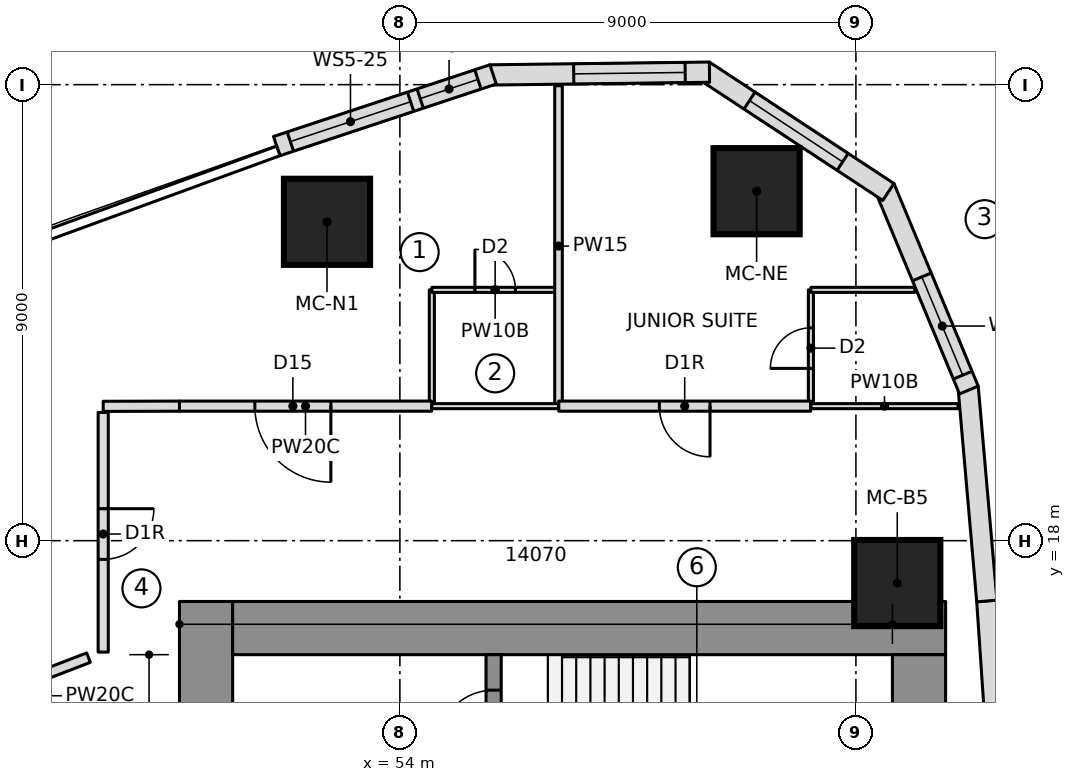
"""IFC4 building model, lengths in metres.
Left out: names, types, materials, properties, quantities, classifications, styles, units other than length and angle.
Written with IfcOpenShell. Run it as: python <this file> out.ifc"""

import sys

from ifc_helpers import new_model, si_unit, direction, frame, frame_2d, origin, origin_2d, place, context, subcontext, project, spatial, polyline, rectangle, outline, extrude, element, fill, save


model = new_model("IFC4")
c1 = context("Model", 3, precision=1e-05, world=origin(), true_north=direction((0.0, 1.0)))
c2 = subcontext(c1, "Body", "Model", "MODEL_VIEW")
j1 = project(units=[si_unit("LENGTHUNIT", "METRE"), si_unit("PLANEANGLEUNIT", "RADIAN")], contexts=[c1])
p1 = place(None, origin())
s1 = spatial("IfcSite", under=j1, at=p1, CompositionType="ELEMENT")
p2 = place(p1, origin())
s2 = spatial("IfcBuilding", under=s1, at=p2, CompositionType="ELEMENT")
p3 = place(p2, frame((0.0, 0.0, 92.0)))
s3 = spatial("IfcBuildingStorey", under=s2, at=p3, CompositionType="ELEMENT", Elevation=92.0)
p4 = place(p3, frame((50.175, 6.65, 0.0), z_axis=(0.0, 0.0, 1.0), x_axis=(0.0, 1.0, 0.0)))
e1 = element("IfcWall", 1, at=p4, inside=s3, PredefinedType="SHEAR", context=c2, shape_type="SweptSolid", body=[
    extrude(rectangle(XDim=10.15, YDim=1.05, at=frame_2d((5.075, 0.0))), origin(), (0.0, 0.0, 1.0), 3.55),
])
p5 = place(p4, frame((6.5, 0.0, 0.0)))
e2 = element("IfcOpeningElement", 2, at=p5, cuts=e1, PredefinedType="OPENING", context=c2, shape_type="SweptSolid", body=[
    extrude(rectangle(XDim=1.1, YDim=2.1, at=frame_2d((0.55, 1.05))), frame((0.0, 0.535, 0.0), z_axis=(0.0, -1.0, 0.0), x_axis=(1.0, 0.0, 0.0)), (0.0, 0.0, 1.0), 1.07),
])
p6 = place(p3, frame((50.7, 16.275, 0.0), z_axis=(0.0, 0.0, 1.0), x_axis=(1.0, 0.0, 0.0)))
e3 = element("IfcWall", 3, at=p6, inside=s3, PredefinedType="SHEAR", context=c2, shape_type="SweptSolid", body=[
    extrude(rectangle(XDim=14.07, YDim=1.05, at=frame_2d((7.035, 0.0))), origin(), (0.0, 0.0, 1.0), 3.55),
])
p7 = place(p3, frame((64.245, 9.389, 0.0), z_axis=(0.0, 0.0, 1.0), x_axis=(0.0, 1.0, 0.0)))
e4 = element("IfcWall", 4, at=p7, inside=s3, PredefinedType="SHEAR", context=c2, shape_type="SweptSolid", body=[
    extrude(rectangle(XDim=6.361, YDim=1.05, at=frame_2d((3.181, 0.0))), origin(), (0.0, 0.0, 1.0), 3.55),
])
p8 = place(p3, frame((55.85, 10.35, 0.0), z_axis=(0.0, 0.0, 1.0), x_axis=(0.0, 1.0, 0.0)))
e5 = element("IfcWall", 5, at=p8, inside=s3, PredefinedType="SHEAR", context=c2, shape_type="SweptSolid", body=[
    extrude(rectangle(XDim=5.4, YDim=0.3, at=frame_2d((2.7, 0.0))), origin(), (0.0, 0.0, 1.0), 3.55),
])
p9 = place(p8, frame((1.43, 0.0, 0.0)))
e6 = element("IfcOpeningElement", 6, at=p9, cuts=e5, PredefinedType="OPENING", context=c2, shape_type="SweptSolid", body=[
    extrude(rectangle(XDim=1.1, YDim=2.1, at=frame_2d((0.55, 1.05))), frame((0.0, 0.16, 0.0), z_axis=(0.0, -1.0, 0.0), x_axis=(1.0, 0.0, 0.0)), (0.0, 0.0, 1.0), 0.32),
])
p10 = place(p8, frame((3.6, 0.0, 0.0)))
e7 = element("IfcOpeningElement", 7, at=p10, cuts=e5, PredefinedType="OPENING", context=c2, shape_type="SweptSolid", body=[
    extrude(rectangle(XDim=1.1, YDim=2.1, at=frame_2d((0.55, 1.05))), frame((0.0, 0.16, 0.0), z_axis=(0.0, -1.0, 0.0), x_axis=(1.0, 0.0, 0.0)), (0.0, 0.0, 1.0), 0.32),
])
for number, where, z_axis, x_axis in (
    (8, (63.816, 17.164, 0.0), (0.0, 0.0, 1.0), (1.0, 0.0, 0.0)),
    (9, (61.04, 24.897, 0.0), (0.0, 0.0, 1.0), (1.0, 0.0, 0.0)),
    (10, (52.562, 24.293, 0.0), (0.0, 0.0, 1.0), (1.0, 0.0, 0.0)),
):
    element("IfcColumn", number, at=place(p3, frame(where, z_axis=z_axis, x_axis=x_axis)), inside=s3, PredefinedType="COLUMN", context=c2, shape_type="SweptSolid", body=[
        extrude(rectangle(XDim=1.7, YDim=1.7, at=origin_2d()), origin(), (0.0, 0.0, 1.0), 3.55),
    ])
p11 = place(p3, frame((65.868, 12.614, 0.0), z_axis=(0.0, 0.0, 1.0), x_axis=(-0.067724559895, 0.997704056315, 0.0)))
e11 = element("IfcWall", 11, at=p11, inside=s3, PredefinedType="NOTDEFINED", context=c2, shape_type="SweptSolid", body=[
    extrude(outline(polyline([(-0.002, -0.2), (4.209, -0.2), (4.205, 0.2), (0.002, 0.2), (-0.002, -0.2)])), origin(), (0.0, 0.0, 1.0), 3.25),
])
p12 = place(p3, frame((65.583, 16.811, 0.0), z_axis=(0.0, 0.0, 1.0), x_axis=(-0.086992730434, 0.996208946382, 0.0)))
e12 = element("IfcWall", 12, at=p12, inside=s3, PredefinedType="NOTDEFINED", context=c2, shape_type="SweptSolid", body=[
    extrude(outline(polyline([(-0.002, -0.2), (4.238, -0.2), (4.176, 0.2), (0.002, 0.2), (-0.002, -0.2)])), origin(), (0.0, 0.0, 1.0), 3.25),
])
p13 = place(p3, frame((65.217, 21.002, 0.0), z_axis=(0.0, 0.0, 1.0), x_axis=(-0.383997751971, 0.923334027577, 0.0)))
e13 = element("IfcWall", 13, at=p13, inside=s3, PredefinedType="NOTDEFINED", context=c2, shape_type="SweptSolid", body=[
    extrude(outline(polyline([(-0.031, -0.2), (4.3, -0.2), (4.177, 0.2), (0.031, 0.2), (-0.031, -0.2)])), origin(), (0.0, 0.0, 1.0), 3.25),
])
p14 = place(p13, frame((0.287, 0.0, 0.6)))
e14 = element("IfcOpeningElement", 14, at=p14, cuts=e13, PredefinedType="OPENING", context=c2, shape_type="SweptSolid", body=[
    extrude(outline(polyline([(0.0, 1.4), (0.08, 1.802), (0.308, 2.142), (0.648, 2.37), (1.05, 2.45), (1.452, 2.37), (1.792, 2.142), (2.02, 1.802), (2.1, 1.4), (2.1, 1.05), (2.02, 0.648), (1.792, 0.308), (1.452, 0.08), (1.05, 0.0), (0.648, 0.08), (0.308, 0.308), (0.08, 0.648), (0.0, 1.05), (0.0, 1.4)])), frame((0.0, 0.21, 0.0), z_axis=(0.0, -1.0, 0.0), x_axis=(1.0, 0.0, 0.0)), (0.0, 0.0, 1.0), 0.42),
])
p15 = place(p3, frame((63.59, 24.916, 0.0), z_axis=(0.0, 0.0, 1.0), x_axis=(-0.835340523653, 0.549732852887, 0.0)))
e15 = element("IfcWall", 15, at=p15, inside=s3, PredefinedType="NOTDEFINED", context=c2, shape_type="SweptSolid", body=[
    extrude(outline(polyline([(-0.061, -0.2), (4.3, -0.2), (4.178, 0.2), (0.061, 0.2), (-0.061, -0.2)])), origin(), (0.0, 0.0, 1.0), 3.25),
])
p16 = place(p15, frame((1.02, 0.0, 0.6)))
e16 = element("IfcOpeningElement", 16, at=p16, cuts=e15, PredefinedType="OPENING", context=c2, shape_type="SweptSolid", body=[
    extrude(outline(polyline([(0.0, 1.35), (0.084, 1.771), (0.322, 2.128), (0.679, 2.366), (1.1, 2.45), (1.521, 2.366), (1.878, 2.128), (2.116, 1.771), (2.2, 1.35), (2.2, 1.1), (2.116, 0.679), (1.878, 0.322), (1.521, 0.084), (1.1, 0.0), (0.679, 0.084), (0.322, 0.322), (0.084, 0.679), (0.0, 1.1), (0.0, 1.35)])), frame((0.0, 0.21, 0.0), z_axis=(0.0, -1.0, 0.0), x_axis=(1.0, 0.0, 0.0)), (0.0, 0.0, 1.0), 0.42),
])
p17 = place(p3, frame((60.049, 27.246, 0.0), z_axis=(0.0, 0.0, 1.0), x_axis=(-0.999919718849, -0.012671063772, 0.0)))
e17 = element("IfcWall", 17, at=p17, inside=s3, PredefinedType="NOTDEFINED", context=c2, shape_type="SweptSolid", body=[
    extrude(outline(polyline([(-0.061, -0.2), (4.27, -0.2), (4.208, 0.2), (0.061, 0.2), (-0.061, -0.2)])), origin(), (0.0, 0.0, 1.0), 3.25),
])
p18 = place(p17, frame((0.418, 0.0, 0.6)))
e18 = element("IfcOpeningElement", 18, at=p18, cuts=e17, PredefinedType="OPENING", context=c2, shape_type="SweptSolid", body=[
    extrude(outline(polyline([(0.0, 1.35), (0.084, 1.771), (0.322, 2.128), (0.679, 2.366), (1.1, 2.45), (1.521, 2.366), (1.878, 2.128), (2.116, 1.771), (2.2, 1.35), (2.2, 1.1), (2.116, 0.679), (1.878, 0.322), (1.521, 0.084), (1.1, 0.0), (0.679, 0.084), (0.322, 0.322), (0.084, 0.679), (0.0, 1.1), (0.0, 1.35)])), frame((0.0, 0.21, 0.0), z_axis=(0.0, -1.0, 0.0), x_axis=(1.0, 0.0, 0.0)), (0.0, 0.0, 1.0), 0.42),
])
p19 = place(p3, frame((55.81, 27.192, 0.0), z_axis=(0.0, 0.0, 1.0), x_axis=(-0.94925004851, -0.314522408429, 0.0)))
e19 = element("IfcWall", 19, at=p19, inside=s3, PredefinedType="NOTDEFINED", context=c2, shape_type="SweptSolid", body=[
    extrude(outline(polyline([(-0.031, -0.2), (4.468, -0.2), (4.468, 0.2), (0.031, 0.2), (-0.031, -0.2)])), origin(), (0.0, 0.0, 1.0), 3.25),
])
p20 = place(p19, frame((0.284, 0.0, 0.9)))
e20 = element("IfcOpeningElement", 20, at=p20, cuts=e19, PredefinedType="OPENING", context=c2, shape_type="SweptSolid", body=[
    extrude(rectangle(XDim=1.2, YDim=1.8, at=frame_2d((0.6, 0.9))), frame((0.0, 0.21, 0.0), z_axis=(0.0, -1.0, 0.0), x_axis=(1.0, 0.0, 0.0)), (0.0, 0.0, 1.0), 0.42),
])
p21 = place(p19, frame((1.684, 0.0, 0.9)))
e21 = element("IfcOpeningElement", 21, at=p21, cuts=e19, PredefinedType="OPENING", context=c2, shape_type="SweptSolid", body=[
    extrude(rectangle(XDim=2.5, YDim=1.8, at=frame_2d((1.25, 0.9))), frame((0.0, 0.21, 0.0), z_axis=(0.0, -1.0, 0.0), x_axis=(1.0, 0.0, 0.0)), (0.0, 0.0, 1.0), 0.42),
])
p22 = place(p3, frame((54.631, 20.65, 0.0), z_axis=(0.0, 0.0, 1.0), x_axis=(0.0, 1.0, 0.0)))
e22 = element("IfcWall", 22, at=p22, inside=s3, PredefinedType="PARTITIONING", context=c2, shape_type="SweptSolid", body=[
    extrude(rectangle(XDim=2.3, YDim=0.1, at=frame_2d((1.15, 0.0))), origin(), (0.0, 0.0, 1.0), 3.25),
])
p23 = place(p3, frame((54.631, 22.95, 0.0), z_axis=(0.0, 0.0, 1.0), x_axis=(1.0, 0.0, 0.0)))
e23 = element("IfcWall", 23, at=p23, inside=s3, PredefinedType="PARTITIONING", context=c2, shape_type="SweptSolid", body=[
    extrude(rectangle(XDim=2.5, YDim=0.1, at=frame_2d((1.25, 0.0))), origin(), (0.0, 0.0, 1.0), 3.25),
])
p24 = place(p23, frame((0.85, 0.0, 0.0)))
e24 = element("IfcOpeningElement", 24, at=p24, cuts=e23, PredefinedType="OPENING", context=c2, shape_type="SweptSolid", body=[
    extrude(rectangle(XDim=0.8, YDim=2.1, at=frame_2d((0.4, 1.05))), frame((0.0, 0.06, 0.0), z_axis=(0.0, -1.0, 0.0), x_axis=(1.0, 0.0, 0.0)), (0.0, 0.0, 1.0), 0.12),
])
p25 = place(p3, frame((62.111, 20.65, 0.0), z_axis=(0.0, 0.0, 1.0), x_axis=(0.0, 1.0, 0.0)))
e25 = element("IfcWall", 25, at=p25, inside=s3, PredefinedType="PARTITIONING", context=c2, shape_type="SweptSolid", body=[
    extrude(rectangle(XDim=2.3, YDim=0.1, at=frame_2d((1.15, 0.0))), origin(), (0.0, 0.0, 1.0), 3.25),
])
p26 = place(p25, frame((0.75, 0.0, 0.0)))
e26 = element("IfcOpeningElement", 26, at=p26, cuts=e25, PredefinedType="OPENING", context=c2, shape_type="SweptSolid", body=[
    extrude(rectangle(XDim=0.8, YDim=2.1, at=frame_2d((0.4, 1.05))), frame((0.0, 0.06, 0.0), z_axis=(0.0, -1.0, 0.0), x_axis=(1.0, 0.0, 0.0)), (0.0, 0.0, 1.0), 0.12),
])
p27 = place(p3, frame((62.111, 22.95, 0.0), z_axis=(0.0, 0.0, 1.0), x_axis=(1.0, 0.0, 0.0)))
e27 = element("IfcWall", 27, at=p27, inside=s3, PredefinedType="PARTITIONING", context=c2, shape_type="SweptSolid", body=[
    extrude(rectangle(XDim=2.049, YDim=0.1, at=frame_2d((1.025, 0.0))), origin(), (0.0, 0.0, 1.0), 3.25),
])
p28 = place(p3, frame((57.131, 20.65, 0.0), z_axis=(0.0, 0.0, 1.0), x_axis=(0.0, 1.0, 0.0)))
e28 = element("IfcWall", 28, at=p28, inside=s3, PredefinedType="PARTITIONING", context=c2, shape_type="SweptSolid", body=[
    extrude(rectangle(XDim=6.329, YDim=0.15, at=frame_2d((3.165, 0.0))), origin(), (0.0, 0.0, 1.0), 3.25),
])
p29 = place(p3, frame((54.625, 20.655, 0.0), z_axis=(0.0, 0.0, 1.0), x_axis=(-1.0, 0.0, 0.0)))
e29 = element("IfcWall", 29, at=p29, inside=s3, PredefinedType="PARTITIONING", context=c2, shape_type="SweptSolid", body=[
    extrude(rectangle(XDim=4.976, YDim=0.2, at=frame_2d((2.488, 0.0))), origin(), (0.0, 0.0, 1.0), 3.25),
])
p30 = place(p29, frame((1.988, 0.0, 0.0)))
e30 = element("IfcOpeningElement", 30, at=p30, cuts=e29, PredefinedType="OPENING", context=c2, shape_type="SweptSolid", body=[
    extrude(rectangle(XDim=1.5, YDim=2.1, at=frame_2d((0.75, 1.05))), frame((0.0, 0.11, 0.0), z_axis=(0.0, -1.0, 0.0), x_axis=(1.0, 0.0, 0.0)), (0.0, 0.0, 1.0), 0.22),
])
p31 = place(p3, frame((62.106, 20.655, 0.0), z_axis=(0.0, 0.0, 1.0), x_axis=(-1.0, 0.0, 0.0)))
e31 = element("IfcWall", 31, at=p31, inside=s3, PredefinedType="PARTITIONING", context=c2, shape_type="SweptSolid", body=[
    extrude(rectangle(XDim=4.971, YDim=0.2, at=frame_2d((2.485, 0.0))), origin(), (0.0, 0.0, 1.0), 3.25),
])
p32 = place(p31, frame((1.985, 0.0, 0.0)))
e32 = element("IfcOpeningElement", 32, at=p32, cuts=e31, PredefinedType="OPENING", context=c2, shape_type="SweptSolid", body=[
    extrude(rectangle(XDim=1.0, YDim=2.1, at=frame_2d((0.5, 1.05))), frame((0.0, 0.11, 0.0), z_axis=(0.0, -1.0, 0.0), x_axis=(1.0, 0.0, 0.0)), (0.0, 0.0, 1.0), 0.22),
])
p33 = place(p3, frame((57.131, 20.655, 0.0), z_axis=(0.0, 0.0, 1.0), x_axis=(-1.0, 0.0, 0.0)))
e33 = element("IfcWall", 33, at=p33, inside=s3, PredefinedType="PARTITIONING", context=c2, shape_type="SweptSolid", body=[
    extrude(rectangle(XDim=2.5, YDim=0.1, at=frame_2d((1.25, 0.0))), origin(), (0.0, 0.0, 1.0), 3.25),
])
p34 = place(p3, frame((65.017, 20.655, 0.0), z_axis=(0.0, 0.0, 1.0), x_axis=(-1.0, 0.0, 0.0)))
e34 = element("IfcWall", 34, at=p34, inside=s3, PredefinedType="PARTITIONING", context=c2, shape_type="SweptSolid", body=[
    extrude(rectangle(XDim=2.906, YDim=0.1, at=frame_2d((1.453, 0.0))), origin(), (0.0, 0.0, 1.0), 3.25),
])
p35 = place(p3, frame((47.855, 15.691, 0.0), z_axis=(0.0, 0.0, 1.0), x_axis=(-0.933116704468, -0.359573658438, 0.0)))
e35 = element("IfcWall", 35, at=p35, inside=s3, PredefinedType="PARTITIONING", context=c2, shape_type="SweptSolid", body=[
    extrude(rectangle(XDim=4.182, YDim=0.2, at=frame_2d((2.091, 0.0))), origin(), (0.0, 0.0, 1.0), 3.25),
])
p36 = place(p3, frame((49.65, 20.655, 0.0), z_axis=(0.0, 0.0, 1.0), x_axis=(-0.999996196879, -0.002757938895, 0.0)))
e36 = element("IfcWall", 36, at=p36, inside=s3, PredefinedType="PARTITIONING", context=c2, shape_type="SweptSolid", body=[
    extrude(rectangle(XDim=1.505, YDim=0.2, at=frame_2d((0.752, 0.0))), origin(), (0.0, 0.0, 1.0), 3.25),
])
p37 = place(p3, frame((48.145, 20.531, 0.0), z_axis=(0.0, 0.0, 1.0), x_axis=(5.1610239e-05, -0.999999998668, 0.0)))
e37 = element("IfcWall", 37, at=p37, inside=s3, PredefinedType="PARTITIONING", context=c2, shape_type="SweptSolid", body=[
    extrude(rectangle(XDim=4.73, YDim=0.2, at=frame_2d((2.365, 0.0))), origin(), (0.0, 0.0, 1.0), 3.25),
])
p38 = place(p37, frame((1.9, 0.0, 0.0)))
e38 = element("IfcOpeningElement", 38, at=p38, cuts=e37, PredefinedType="OPENING", context=c2, shape_type="SweptSolid", body=[
    extrude(rectangle(XDim=1.0, YDim=2.1, at=frame_2d((0.5, 1.05))), frame((0.0, 0.11, 0.0), z_axis=(0.0, -1.0, 0.0), x_axis=(1.0, 0.0, 0.0)), (0.0, 0.0, 1.0), 0.22),
])
p39 = place(p14, origin())
e39 = element("IfcWindow", 39, at=p39, inside=s3, PartitioningType="SINGLE_PANEL", PredefinedType="WINDOW", context=c2, shape_type="SweptSolid", body=[
    extrude(outline(polyline([(0.0, 1.4), (0.08, 1.802), (0.308, 2.142), (0.648, 2.37), (1.05, 2.45), (1.452, 2.37), (1.792, 2.142), (2.02, 1.802), (2.1, 1.4), (2.1, 1.05), (2.02, 0.648), (1.792, 0.308), (1.452, 0.08), (1.05, 0.0), (0.648, 0.08), (0.308, 0.308), (0.08, 0.648), (0.0, 1.05), (0.0, 1.4)])), frame((0.0, 0.17, 0.0), z_axis=(0.0, -1.0, 0.0), x_axis=(1.0, 0.0, 0.0)), (0.0, 0.0, 1.0), 0.06),
])
fill(e14, e39)
p40 = place(p16, origin())
e40 = element("IfcWindow", 40, at=p40, inside=s3, PartitioningType="SINGLE_PANEL", PredefinedType="WINDOW", context=c2, shape_type="SweptSolid", body=[
    extrude(outline(polyline([(0.0, 1.35), (0.084, 1.771), (0.322, 2.128), (0.679, 2.366), (1.1, 2.45), (1.521, 2.366), (1.878, 2.128), (2.116, 1.771), (2.2, 1.35), (2.2, 1.1), (2.116, 0.679), (1.878, 0.322), (1.521, 0.084), (1.1, 0.0), (0.679, 0.084), (0.322, 0.322), (0.084, 0.679), (0.0, 1.1), (0.0, 1.35)])), frame((0.0, 0.17, 0.0), z_axis=(0.0, -1.0, 0.0), x_axis=(1.0, 0.0, 0.0)), (0.0, 0.0, 1.0), 0.06),
])
fill(e16, e40)
p41 = place(p18, origin())
e41 = element("IfcWindow", 41, at=p41, inside=s3, PartitioningType="SINGLE_PANEL", PredefinedType="WINDOW", context=c2, shape_type="SweptSolid", body=[
    extrude(outline(polyline([(0.0, 1.35), (0.084, 1.771), (0.322, 2.128), (0.679, 2.366), (1.1, 2.45), (1.521, 2.366), (1.878, 2.128), (2.116, 1.771), (2.2, 1.35), (2.2, 1.1), (2.116, 0.679), (1.878, 0.322), (1.521, 0.084), (1.1, 0.0), (0.679, 0.084), (0.322, 0.322), (0.084, 0.679), (0.0, 1.1), (0.0, 1.35)])), frame((0.0, 0.17, 0.0), z_axis=(0.0, -1.0, 0.0), x_axis=(1.0, 0.0, 0.0)), (0.0, 0.0, 1.0), 0.06),
])
fill(e18, e41)
p42 = place(p20, origin())
e42 = element("IfcWindow", 42, at=p42, inside=s3, PartitioningType="SINGLE_PANEL", PredefinedType="WINDOW", context=c2, shape_type="SweptSolid", body=[
    extrude(rectangle(XDim=1.2, YDim=1.8, at=frame_2d((0.6, 0.9))), frame((0.0, 0.17, 0.0), z_axis=(0.0, -1.0, 0.0), x_axis=(1.0, 0.0, 0.0)), (0.0, 0.0, 1.0), 0.06),
])
fill(e20, e42)
p43 = place(p21, origin())
e43 = element("IfcWindow", 43, at=p43, inside=s3, PartitioningType="SINGLE_PANEL", PredefinedType="WINDOW", context=c2, shape_type="SweptSolid", body=[
    extrude(rectangle(XDim=2.5, YDim=1.8, at=frame_2d((1.25, 0.9))), frame((0.0, 0.17, 0.0), z_axis=(0.0, -1.0, 0.0), x_axis=(1.0, 0.0, 0.0)), (0.0, 0.0, 1.0), 0.06),
])
fill(e21, e43)
p44 = place(p24, origin())
e44 = element("IfcDoor", 44, at=p44, inside=s3, OperationType="SINGLE_SWING_LEFT", PredefinedType="DOOR", context=c2, shape_type="SweptSolid", body=[
    extrude(rectangle(XDim=0.8, YDim=2.1, at=frame_2d((0.4, 1.05))), frame((0.0, 0.025, 0.0), z_axis=(0.0, -1.0, 0.0), x_axis=(1.0, 0.0, 0.0)), (0.0, 0.0, 1.0), 0.05),
])
fill(e24, e44)
p45 = place(p26, origin())
e45 = element("IfcDoor", 45, at=p45, inside=s3, OperationType="SINGLE_SWING_LEFT", PredefinedType="DOOR", context=c2, shape_type="SweptSolid", body=[
    extrude(rectangle(XDim=0.8, YDim=2.1, at=frame_2d((0.4, 1.05))), frame((0.0, 0.025, 0.0), z_axis=(0.0, -1.0, 0.0), x_axis=(1.0, 0.0, 0.0)), (0.0, 0.0, 1.0), 0.05),
])
fill(e26, e45)
p46 = place(p30, origin())
e46 = element("IfcDoor", 46, at=p46, inside=s3, OperationType="DOUBLE_DOOR_SINGLE_SWING", PredefinedType="DOOR", context=c2, shape_type="SweptSolid", body=[
    extrude(rectangle(XDim=1.5, YDim=2.1, at=frame_2d((0.75, 1.05))), frame((0.0, 0.025, 0.0), z_axis=(0.0, -1.0, 0.0), x_axis=(1.0, 0.0, 0.0)), (0.0, 0.0, 1.0), 0.05),
])
fill(e30, e46)
p47 = place(p32, origin())
e47 = element("IfcDoor", 47, at=p47, inside=s3, OperationType="SINGLE_SWING_RIGHT", PredefinedType="DOOR", context=c2, shape_type="SweptSolid", body=[
    extrude(rectangle(XDim=1.0, YDim=2.1, at=frame_2d((0.5, 1.05))), frame((0.0, 0.025, 0.0), z_axis=(0.0, -1.0, 0.0), x_axis=(1.0, 0.0, 0.0)), (0.0, 0.0, 1.0), 0.05),
])
fill(e32, e47)
p48 = place(p38, origin())
e48 = element("IfcDoor", 48, at=p48, inside=s3, OperationType="SINGLE_SWING_RIGHT", PredefinedType="DOOR", context=c2, shape_type="SweptSolid", body=[
    extrude(rectangle(XDim=1.0, YDim=2.1, at=frame_2d((0.5, 1.05))), frame((0.0, 0.025, 0.0), z_axis=(0.0, -1.0, 0.0), x_axis=(1.0, 0.0, 0.0)), (0.0, 0.0, 1.0), 0.05),
])
fill(e38, e48)
p49 = place(p10, origin())
e49 = element("IfcDoor", 49, at=p49, inside=s3, OperationType="SINGLE_SWING_RIGHT", PredefinedType="DOOR", context=c2, shape_type="SweptSolid", body=[
    extrude(rectangle(XDim=1.1, YDim=2.1, at=frame_2d((0.55, 1.05))), frame((0.0, 0.025, 0.0), z_axis=(0.0, -1.0, 0.0), x_axis=(1.0, 0.0, 0.0)), (0.0, 0.0, 1.0), 0.05),
])
fill(e7, e49)
save(model, sys.argv[1])
